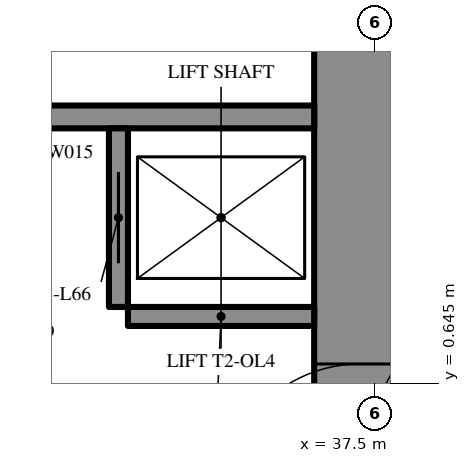
"""IFC4 building model, lengths in metres.
Left out: names, types, materials, properties, quantities, classifications, styles, units other than length and angle.
Written with IfcOpenShell. Run it as: python <this file> out.ifc"""

import sys

from ifc_helpers import new_model, si_unit, direction, frame, frame_2d, origin, place, context, subcontext, project, spatial, rectangle, extrude, element, fill, save


model = new_model("IFC4")
c1 = context("Model", 3, precision=1e-05, world=origin(), true_north=direction((0.0, 1.0)))
c2 = subcontext(c1, "Body", "Model", "MODEL_VIEW")
j1 = project(units=[si_unit("LENGTHUNIT", "METRE"), si_unit("PLANEANGLEUNIT", "RADIAN")], contexts=[c1])
p1 = place(None, origin())
s1 = spatial("IfcSite", under=j1, at=p1, CompositionType="ELEMENT")
p2 = place(p1, origin())
s2 = spatial("IfcBuilding", under=s1, at=p2, CompositionType="ELEMENT")
p3 = place(p2, frame((0.0, 0.0, 247.7)))
s3 = spatial("IfcBuildingStorey", under=s2, at=p3, CompositionType="ELEMENT", Elevation=247.7)
p4 = place(p3, frame((37.3, -8.6, 0.0), z_axis=(0.0, 0.0, 1.0), x_axis=(0.0, 1.0, 0.0)))
e1 = element("IfcWall", 1, at=p4, inside=s3, PredefinedType="SHEAR", context=c2, shape_type="SweptSolid", body=[
    extrude(rectangle(XDim=17.2, YDim=1.2, at=frame_2d((8.6, 0.0))), origin(), (0.0, 0.0, 1.0), 4.2),
])
p5 = place(p4, frame((7.7, 0.0, 0.0)))
e2 = element("IfcOpeningElement", 2, at=p5, cuts=e1, PredefinedType="OPENING", context=c2, shape_type="SweptSolid", body=[
    extrude(rectangle(XDim=1.8, YDim=2.2, at=frame_2d((0.9, 1.1))), frame((0.0, 0.61, 0.0), z_axis=(0.0, -1.0, 0.0), x_axis=(1.0, 0.0, 0.0)), (0.0, 0.0, 1.0), 1.22),
])
p6 = place(p3, frame((28.3, 4.15, 0.0), z_axis=(0.0, 0.0, 1.0), x_axis=(1.0, 0.0, 0.0)))
e3 = element("IfcWall", 3, at=p6, inside=s3, PredefinedType="SHEAR", context=c2, shape_type="SweptSolid", body=[
    extrude(rectangle(XDim=8.4, YDim=0.3, at=frame_2d((4.2, 0.0))), origin(), (0.0, 0.0, 1.0), 4.2),
])
p7 = place(p3, frame((34.125, 1.65, 0.0), z_axis=(0.0, 0.0, 1.0), x_axis=(0.0, 1.0, 0.0)))
e4 = element("IfcWall", 4, at=p7, inside=s3, PredefinedType="SHEAR", context=c2, shape_type="SweptSolid", body=[
    extrude(rectangle(XDim=2.35, YDim=0.25, at=frame_2d((1.175, 0.0))), origin(), (0.0, 0.0, 1.0), 4.2),
])
p8 = place(p7, frame((0.575, 0.0, 0.0)))
e5 = element("IfcOpeningElement", 5, at=p8, cuts=e4, PredefinedType="OPENING", context=c2, shape_type="SweptSolid", body=[
    extrude(rectangle(XDim=1.2, YDim=2.2, at=frame_2d((0.6, 1.1))), frame((0.0, 0.135, 0.0), z_axis=(0.0, -1.0, 0.0), x_axis=(1.0, 0.0, 0.0)), (0.0, 0.0, 1.0), 0.27),
])
p9 = place(p3, frame((34.25, 1.525, 0.0), z_axis=(0.0, 0.0, 1.0), x_axis=(1.0, 0.0, 0.0)))
e6 = element("IfcWall", 6, at=p9, inside=s3, PredefinedType="SHEAR", context=c2, shape_type="SweptSolid", body=[
    extrude(rectangle(XDim=2.45, YDim=0.25, at=frame_2d((1.225, 0.0))), origin(), (0.0, 0.0, 1.0), 4.2),
])
p10 = place(p3, frame((27.2, -13.8, 0.0), z_axis=(0.0, 0.0, 1.0), x_axis=(0.866027159892, 0.499996958321, 0.0)))
e7 = element("IfcWall", 7, at=p10, inside=s3, PredefinedType="SHEAR", context=c2, shape_type="SweptSolid", body=[
    extrude(rectangle(XDim=27.947, YDim=1.2, at=frame_2d((13.973, 0.0))), origin(), (0.0, 0.0, 1.0), 4.2),
])
p11 = place(p10, frame((4.6, 0.0, 0.0)))
e8 = element("IfcOpeningElement", 8, at=p11, cuts=e7, PredefinedType="OPENING", context=c2, shape_type="SweptSolid", body=[
    extrude(rectangle(XDim=1.0, YDim=2.2, at=frame_2d((0.5, 1.1))), frame((0.0, 0.61, 0.0), z_axis=(0.0, -1.0, 0.0), x_axis=(1.0, 0.0, 0.0)), (0.0, 0.0, 1.0), 1.22),
])
p12 = place(p10, frame((13.395, 0.0, 0.0)))
e9 = element("IfcOpeningElement", 9, at=p12, cuts=e7, PredefinedType="OPENING", context=c2, shape_type="SweptSolid", body=[
    extrude(rectangle(XDim=1.8, YDim=2.2, at=frame_2d((0.9, 1.1))), frame((0.0, 0.61, 0.0), z_axis=(0.0, -1.0, 0.0), x_axis=(1.0, 0.0, 0.0)), (0.0, 0.0, 1.0), 1.22),
])
p13 = place(p3, frame((27.2, 13.8, 0.0), z_axis=(0.0, 0.0, 1.0), x_axis=(0.866024515034, -0.500001539357, 0.0)))
e10 = element("IfcWall", 10, at=p13, inside=s3, PredefinedType="SHEAR", context=c2, shape_type="SweptSolid", body=[
    extrude(rectangle(XDim=26.907, YDim=1.2, at=frame_2d((13.454, 0.0))), origin(), (0.0, 0.0, 1.0), 4.2),
])
p14 = place(p13, frame((4.6, 0.0, 0.0)))
e11 = element("IfcOpeningElement", 11, at=p14, cuts=e10, PredefinedType="OPENING", context=c2, shape_type="SweptSolid", body=[
    extrude(rectangle(XDim=1.0, YDim=2.2, at=frame_2d((0.5, 1.1))), frame((0.0, 0.61, 0.0), z_axis=(0.0, -1.0, 0.0), x_axis=(1.0, 0.0, 0.0)), (0.0, 0.0, 1.0), 1.22),
])
p15 = place(p13, frame((13.395, 0.0, 0.0)))
e12 = element("IfcOpeningElement", 12, at=p15, cuts=e10, PredefinedType="OPENING", context=c2, shape_type="SweptSolid", body=[
    extrude(rectangle(XDim=1.8, YDim=2.2, at=frame_2d((0.9, 1.1))), frame((0.0, 0.61, 0.0), z_axis=(0.0, -1.0, 0.0), x_axis=(1.0, 0.0, 0.0)), (0.0, 0.0, 1.0), 1.22),
])
p16 = place(p5, origin())
e13 = element("IfcDoor", 13, at=p16, inside=s3, OperationType="DOUBLE_DOOR_SINGLE_SWING", PredefinedType="DOOR", context=c2, shape_type="SweptSolid", body=[
    extrude(rectangle(XDim=1.8, YDim=2.2, at=frame_2d((0.9, 1.1))), frame((0.0, 0.025, 0.0), z_axis=(0.0, -1.0, 0.0), x_axis=(1.0, 0.0, 0.0)), (0.0, 0.0, 1.0), 0.05),
])
fill(e2, e13)
p17 = place(p8, origin())
e14 = element("IfcDoor", 14, at=p17, inside=s3, OperationType="DOUBLE_DOOR_SLIDING", PredefinedType="USERDEFINED", context=c2, shape_type="SweptSolid", body=[
    extrude(rectangle(XDim=1.2, YDim=2.2, at=frame_2d((0.6, 1.1))), frame((0.0, 0.025, 0.0), z_axis=(0.0, -1.0, 0.0), x_axis=(1.0, 0.0, 0.0)), (0.0, 0.0, 1.0), 0.05),
])
fill(e5, e14)
save(model, sys.argv[1])
